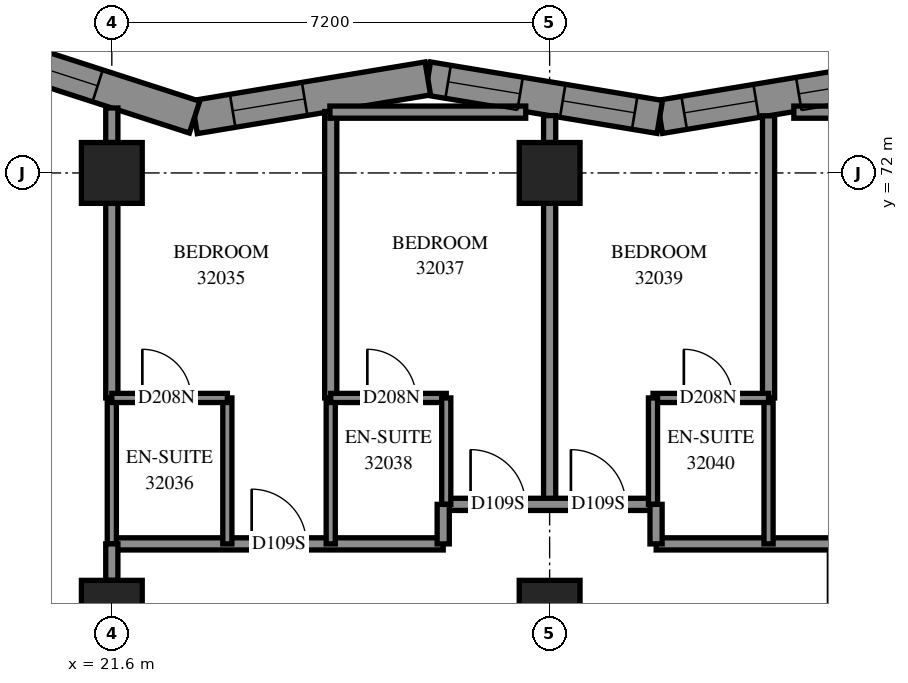
"""IFC4 building model, lengths in metres.
Left out: names, types, materials, properties, quantities, classifications, styles, units other than length and angle.
Written with IfcOpenShell. Run it as: python <this file> out.ifc"""

import sys

from ifc_helpers import new_model, si_unit, direction, frame, frame_2d, origin, origin_2d, place, context, subcontext, project, spatial, polyline, rectangle, outline, extrude, element, fill, save


model = new_model("IFC4")
c1 = context("Model", 3, precision=1e-05, world=origin(), true_north=direction((0.0, 1.0)))
c2 = subcontext(c1, "Body", "Model", "MODEL_VIEW")
j1 = project(units=[si_unit("LENGTHUNIT", "METRE"), si_unit("PLANEANGLEUNIT", "RADIAN")], contexts=[c1])
p1 = place(None, origin())
s1 = spatial("IfcSite", under=j1, at=p1, CompositionType="ELEMENT")
p2 = place(p1, origin())
s2 = spatial("IfcBuilding", under=s1, at=p2, CompositionType="ELEMENT")
p3 = place(p2, frame((0.0, 0.0, 118.6)))
s3 = spatial("IfcBuildingStorey", under=s2, at=p3, CompositionType="ELEMENT", Elevation=118.6)
for number, where, z_axis, x_axis in (
    (1, (21.6, 64.8, 0.0), (0.0, 0.0, 1.0), (1.0, 0.0, 0.0)),
    (2, (21.6, 72.0, 0.0), (0.0, 0.0, 1.0), (1.0, 0.0, 0.0)),
    (3, (28.8, 64.8, 0.0), (0.0, 0.0, 1.0), (1.0, 0.0, 0.0)),
    (4, (28.8, 72.0, 0.0), (0.0, 0.0, 1.0), (1.0, 0.0, 0.0)),
):
    element("IfcColumn", number, at=place(p3, frame(where, z_axis=z_axis, x_axis=x_axis)), inside=s3, PredefinedType="COLUMN", context=c2, shape_type="SweptSolid", body=[
        extrude(rectangle(XDim=1.0, YDim=1.0, at=origin_2d()), origin(), (0.0, 0.0, 1.0), 3.1),
    ])
p4 = place(p3, frame((34.426, 73.554, 0.0), z_axis=(0.0, 0.0, 1.0), x_axis=(-0.9865103981, -0.1636986085, 0.0)))
e5 = element("IfcWall", 5, at=p4, inside=s3, PredefinedType="SOLIDWALL", context=c2, shape_type="SweptSolid", body=[
    extrude(outline(polyline([(-0.046, -0.275), (3.821, -0.275), (3.913, 0.275), (0.046, 0.275), (-0.046, -0.275)])), origin(), (0.0, 0.0, 1.0), 3.1),
])
p5 = place(p4, frame((0.35, 0.0, 0.5)))
e6 = element("IfcOpeningElement", 6, at=p5, cuts=e5, PredefinedType="OPENING", context=c2, shape_type="SweptSolid", body=[
    extrude(rectangle(XDim=1.2, YDim=2.45, at=frame_2d((0.6, 1.225))), frame((0.0, 0.285, 0.0), z_axis=(0.0, -1.0, 0.0), x_axis=(1.0, 0.0, 0.0)), (0.0, 0.0, 1.0), 0.57),
])
p6 = place(p4, frame((2.26, 0.0, 0.5)))
e7 = element("IfcOpeningElement", 7, at=p6, cuts=e5, PredefinedType="OPENING", context=c2, shape_type="SweptSolid", body=[
    extrude(rectangle(XDim=1.2, YDim=2.45, at=frame_2d((0.6, 1.225))), frame((0.0, 0.285, 0.0), z_axis=(0.0, -1.0, 0.0), x_axis=(1.0, 0.0, 0.0)), (0.0, 0.0, 1.0), 0.57),
])
p7 = place(p3, frame((30.611, 72.921, 0.0), z_axis=(0.0, 0.0, 1.0), x_axis=(-0.9865110911, 0.1636944324, 0.0)))
e8 = element("IfcWall", 8, at=p7, inside=s3, PredefinedType="SOLIDWALL", context=c2, shape_type="SweptSolid", body=[
    extrude(outline(polyline([(0.046, -0.275), (3.913, -0.275), (3.821, 0.275), (-0.046, 0.275), (0.046, -0.275)])), origin(), (0.0, 0.0, 1.0), 3.1),
])
p8 = place(p7, frame((0.418, 0.0, 0.5)))
e9 = element("IfcOpeningElement", 9, at=p8, cuts=e8, PredefinedType="OPENING", context=c2, shape_type="SweptSolid", body=[
    extrude(rectangle(XDim=1.2, YDim=2.45, at=frame_2d((0.6, 1.225))), frame((0.0, 0.285, 0.0), z_axis=(0.0, -1.0, 0.0), x_axis=(1.0, 0.0, 0.0)), (0.0, 0.0, 1.0), 0.57),
])
p9 = place(p7, frame((2.329, 0.0, 0.5)))
e10 = element("IfcOpeningElement", 10, at=p9, cuts=e8, PredefinedType="OPENING", context=c2, shape_type="SweptSolid", body=[
    extrude(rectangle(XDim=1.2, YDim=2.45, at=frame_2d((0.6, 1.225))), frame((0.0, 0.285, 0.0), z_axis=(0.0, -1.0, 0.0), x_axis=(1.0, 0.0, 0.0)), (0.0, 0.0, 1.0), 0.57),
])
p10 = place(p3, frame((26.797, 73.554, 0.0), z_axis=(0.0, 0.0, 1.0), x_axis=(-0.9865146039, -0.1636732608, 0.0)))
e11 = element("IfcWall", 11, at=p10, inside=s3, PredefinedType="SOLIDWALL", context=c2, shape_type="SweptSolid", body=[
    extrude(outline(polyline([(-0.046, -0.275), (3.821, -0.275), (3.955, 0.275), (0.046, 0.275), (-0.046, -0.275)])), origin(), (0.0, 0.0, 1.0), 3.1),
])
p11 = place(p10, frame((2.053, 0.0, 0.5)))
e12 = element("IfcOpeningElement", 12, at=p11, cuts=e11, PredefinedType="OPENING", context=c2, shape_type="SweptSolid", body=[
    extrude(rectangle(XDim=1.2, YDim=2.45, at=frame_2d((0.6, 1.225))), frame((0.0, 0.285, 0.0), z_axis=(0.0, -1.0, 0.0), x_axis=(1.0, 0.0, 0.0)), (0.0, 0.0, 1.0), 0.57),
])
p12 = place(p3, frame((22.961, 72.918, 0.0), z_axis=(0.0, 0.0, 1.0), x_axis=(-0.9515343902, 0.3075423616, 0.0)))
e13 = element("IfcWall", 13, at=p12, inside=s3, PredefinedType="SOLIDWALL", context=c2, shape_type="SweptSolid", body=[
    extrude(outline(polyline([(0.067, -0.275), (4.076, -0.275), (3.32, 0.275), (-0.067, 0.275), (0.067, -0.275)])), origin(), (0.0, 0.0, 1.0), 3.1),
])
p13 = place(p12, frame((1.675, 0.0, 0.5)))
e14 = element("IfcOpeningElement", 14, at=p13, cuts=e13, PredefinedType="OPENING", context=c2, shape_type="SweptSolid", body=[
    extrude(rectangle(XDim=1.2, YDim=2.45, at=frame_2d((0.6, 1.225))), frame((0.0, 0.285, 0.0), z_axis=(0.0, -1.0, 0.0), x_axis=(1.0, 0.0, 0.0)), (0.0, 0.0, 1.0), 0.57),
])
p14 = place(p3, frame((21.6, 65.9, 0.0), z_axis=(0.0, 0.0, 1.0), x_axis=(1.0, 0.0, 0.0)))
e15 = element("IfcWall", 15, at=p14, inside=s3, PredefinedType="PARTITIONING", context=c2, shape_type="SweptSolid", body=[
    extrude(rectangle(XDim=5.45, YDim=0.2, at=frame_2d((2.725, 0.0))), origin(), (0.0, 0.0, 1.0), 3.1),
])
p15 = place(p14, frame((2.3, 0.0, 0.0)))
e16 = element("IfcOpeningElement", 16, at=p15, cuts=e15, PredefinedType="OPENING", context=c2, shape_type="SweptSolid", body=[
    extrude(rectangle(XDim=0.9, YDim=2.1, at=frame_2d((0.45, 1.05))), frame((0.0, 0.11, 0.0), z_axis=(0.0, -1.0, 0.0), x_axis=(1.0, 0.0, 0.0)), (0.0, 0.0, 1.0), 0.22),
])
p16 = place(p3, frame((28.8, 66.55, 0.0), z_axis=(0.0, 0.0, 1.0), x_axis=(0.0, 1.0, 0.0)))
e17 = element("IfcWall", 17, at=p16, inside=s3, PredefinedType="PARTITIONING", context=c2, shape_type="SweptSolid", body=[
    extrude(rectangle(XDim=4.95, YDim=0.2, at=frame_2d((2.475, 0.0))), origin(), (0.0, 0.0, 1.0), 3.1),
])
p17 = place(p3, frame((25.2, 68.3, 0.0), z_axis=(0.0, 0.0, 1.0), x_axis=(0.0, 1.0, 0.0)))
e18 = element("IfcWall", 18, at=p17, inside=s3, PredefinedType="PARTITIONING", context=c2, shape_type="SweptSolid", body=[
    extrude(rectangle(XDim=4.711, YDim=0.2, at=frame_2d((2.355, 0.0))), origin(), (0.0, 0.0, 1.0), 3.1),
])
p18 = place(p3, frame((32.4, 68.3, 0.0), z_axis=(0.0, 0.0, 1.0), x_axis=(0.0, 1.0, 0.0)))
e19 = element("IfcWall", 19, at=p18, inside=s3, PredefinedType="PARTITIONING", context=c2, shape_type="SweptSolid", body=[
    extrude(rectangle(XDim=4.639, YDim=0.2, at=frame_2d((2.32, 0.0))), origin(), (0.0, 0.0, 1.0), 3.1),
])
p19 = place(p3, frame((27.1, 66.55, 0.0), z_axis=(0.0, 0.0, 1.0), x_axis=(1.0, 0.0, 0.0)))
e20 = element("IfcWall", 20, at=p19, inside=s3, PredefinedType="PARTITIONING", context=c2, shape_type="SweptSolid", body=[
    extrude(rectangle(XDim=3.4, YDim=0.2, at=frame_2d((1.7, 0.0))), origin(), (0.0, 0.0, 1.0), 3.1),
])
p20 = place(p19, frame((0.4, 0.0, 0.0)))
e21 = element("IfcOpeningElement", 21, at=p20, cuts=e20, PredefinedType="OPENING", context=c2, shape_type="SweptSolid", body=[
    extrude(rectangle(XDim=0.9, YDim=2.1, at=frame_2d((0.45, 1.05))), frame((0.0, 0.11, 0.0), z_axis=(0.0, -1.0, 0.0), x_axis=(1.0, 0.0, 0.0)), (0.0, 0.0, 1.0), 0.22),
])
p21 = place(p19, frame((2.05, 0.0, 0.0)))
e22 = element("IfcOpeningElement", 22, at=p21, cuts=e20, PredefinedType="OPENING", context=c2, shape_type="SweptSolid", body=[
    extrude(rectangle(XDim=0.9, YDim=2.1, at=frame_2d((0.45, 1.05))), frame((0.0, 0.11, 0.0), z_axis=(0.0, -1.0, 0.0), x_axis=(1.0, 0.0, 0.0)), (0.0, 0.0, 1.0), 0.22),
])
p22 = place(p3, frame((32.816, 73.0, 0.0), z_axis=(0.0, 0.0, 1.0), x_axis=(1.0, 0.0, 0.0)))
e23 = element("IfcWall", 23, at=p22, inside=s3, PredefinedType="PARTITIONING", context=c2, shape_type="SweptSolid", body=[
    extrude(rectangle(XDim=3.22, YDim=0.2, at=frame_2d((1.61, 0.0))), origin(), (0.0, 0.0, 1.0), 3.1),
])
p23 = place(p3, frame((25.186, 73.0, 0.0), z_axis=(0.0, 0.0, 1.0), x_axis=(1.0, 0.0, 0.0)))
e24 = element("IfcWall", 24, at=p23, inside=s3, PredefinedType="PARTITIONING", context=c2, shape_type="SweptSolid", body=[
    extrude(rectangle(XDim=3.22, YDim=0.2, at=frame_2d((1.61, 0.0))), origin(), (0.0, 0.0, 1.0), 3.1),
])
p24 = place(p3, frame((21.6, 68.3, 0.0), z_axis=(0.0, 0.0, 1.0), x_axis=(0.0, 1.0, 0.0)))
e25 = element("IfcWall", 25, at=p24, inside=s3, PredefinedType="PARTITIONING", context=c2, shape_type="SweptSolid", body=[
    extrude(rectangle(XDim=3.2, YDim=0.2, at=frame_2d((1.6, 0.0))), origin(), (0.0, 0.0, 1.0), 2.6),
])
p25 = place(p3, frame((30.552, 65.9, 0.0), z_axis=(0.0, 0.0, 1.0), x_axis=(1.0, 0.0, 0.0)))
e26 = element("IfcWall", 26, at=p25, inside=s3, PredefinedType="PARTITIONING", context=c2, shape_type="SweptSolid", body=[
    extrude(rectangle(XDim=2.948, YDim=0.2, at=frame_2d((1.474, 0.0))), origin(), (0.0, 0.0, 1.0), 3.1),
])
p26 = place(p3, frame((21.6, 65.9, 0.0), z_axis=(0.0, 0.0, 1.0), x_axis=(0.0, 1.0, 0.0)))
e27 = element("IfcWall", 27, at=p26, inside=s3, PredefinedType="PARTITIONING", context=c2, shape_type="SweptSolid", body=[
    extrude(rectangle(XDim=2.4, YDim=0.15, at=frame_2d((1.2, 0.0))), origin(), (0.0, 0.0, 1.0), 2.6),
])
for number, where, z_axis, x_axis in (
    (28, (23.5, 65.9, 0.0), (0.0, 0.0, 1.0), (0.0, 1.0, 0.0)),
    (29, (25.2, 65.9, 0.0), (0.0, 0.0, 1.0), (0.0, 1.0, 0.0)),
    (30, (32.4, 65.9, 0.0), (0.0, 0.0, 1.0), (0.0, 1.0, 0.0)),
):
    element("IfcWall", number, at=place(p3, frame(where, z_axis=z_axis, x_axis=x_axis)), inside=s3, PredefinedType="PARTITIONING", context=c2, shape_type="SweptSolid", body=[
        extrude(rectangle(XDim=2.4, YDim=0.15, at=frame_2d((1.2, 0.0))), origin(), (0.0, 0.0, 1.0), 3.1),
    ])
p27 = place(p3, frame((25.2, 68.3, 0.0), z_axis=(0.0, 0.0, 1.0), x_axis=(1.0, 0.0, 0.0)))
e31 = element("IfcWall", 31, at=p27, inside=s3, PredefinedType="PARTITIONING", context=c2, shape_type="SweptSolid", body=[
    extrude(rectangle(XDim=1.9, YDim=0.15, at=frame_2d((0.95, 0.0))), origin(), (0.0, 0.0, 1.0), 3.1),
])
p28 = place(p27, frame((0.602, 0.0, 0.0)))
e32 = element("IfcOpeningElement", 32, at=p28, cuts=e31, PredefinedType="OPENING", context=c2, shape_type="SweptSolid", body=[
    extrude(rectangle(XDim=0.8, YDim=2.1, at=frame_2d((0.4, 1.05))), frame((0.0, 0.085, 0.0), z_axis=(0.0, -1.0, 0.0), x_axis=(1.0, 0.0, 0.0)), (0.0, 0.0, 1.0), 0.17),
])
p29 = place(p3, frame((21.6, 68.3, 0.0), z_axis=(0.0, 0.0, 1.0), x_axis=(1.0, 0.0, 0.0)))
e33 = element("IfcWall", 33, at=p29, inside=s3, PredefinedType="PARTITIONING", context=c2, shape_type="SweptSolid", body=[
    extrude(rectangle(XDim=1.9, YDim=0.15, at=frame_2d((0.95, 0.0))), origin(), (0.0, 0.0, 1.0), 3.1),
])
p30 = place(p29, frame((0.502, 0.0, 0.0)))
e34 = element("IfcOpeningElement", 34, at=p30, cuts=e33, PredefinedType="OPENING", context=c2, shape_type="SweptSolid", body=[
    extrude(rectangle(XDim=0.8, YDim=2.1, at=frame_2d((0.4, 1.05))), frame((0.0, 0.085, 0.0), z_axis=(0.0, -1.0, 0.0), x_axis=(1.0, 0.0, 0.0)), (0.0, 0.0, 1.0), 0.17),
])
p31 = place(p3, frame((30.5, 68.3, 0.0), z_axis=(0.0, 0.0, 1.0), x_axis=(1.0, 0.0, 0.0)))
e35 = element("IfcWall", 35, at=p31, inside=s3, PredefinedType="PARTITIONING", context=c2, shape_type="SweptSolid", body=[
    extrude(rectangle(XDim=1.9, YDim=0.15, at=frame_2d((0.95, 0.0))), origin(), (0.0, 0.0, 1.0), 3.1),
])
p32 = place(p31, frame((0.507, 0.0, 0.0)))
e36 = element("IfcOpeningElement", 36, at=p32, cuts=e35, PredefinedType="OPENING", context=c2, shape_type="SweptSolid", body=[
    extrude(rectangle(XDim=0.8, YDim=2.1, at=frame_2d((0.4, 1.05))), frame((0.0, 0.085, 0.0), z_axis=(0.0, -1.0, 0.0), x_axis=(1.0, 0.0, 0.0)), (0.0, 0.0, 1.0), 0.17),
])
for number, where, z_axis, x_axis in (
    (37, (27.1, 66.55, 0.0), (0.0, 0.0, 1.0), (0.0, 1.0, 0.0)),
    (38, (30.5, 66.55, 0.0), (0.0, 0.0, 1.0), (0.0, 1.0, 0.0)),
):
    element("IfcWall", number, at=place(p3, frame(where, z_axis=z_axis, x_axis=x_axis)), inside=s3, PredefinedType="PARTITIONING", context=c2, shape_type="SweptSolid", body=[
        extrude(rectangle(XDim=1.75, YDim=0.15, at=frame_2d((0.875, 0.0))), origin(), (0.0, 0.0, 1.0), 3.1),
    ])
for number, where, z_axis, x_axis in (
    (39, (27.05, 65.9, 0.0), (0.0, 0.0, 1.0), (0.0, 1.0, 0.0)),
    (40, (30.55, 65.9, 0.0), (0.0, 0.0, 1.0), (0.0, 1.0, 0.0)),
):
    element("IfcWall", number, at=place(p3, frame(where, z_axis=z_axis, x_axis=x_axis)), inside=s3, PredefinedType="PARTITIONING", context=c2, shape_type="SweptSolid", body=[
        extrude(rectangle(XDim=0.65, YDim=0.2, at=frame_2d((0.325, 0.0))), origin(), (0.0, 0.0, 1.0), 3.1),
    ])
p33 = place(p3, frame((21.6, 65.3, 0.0), z_axis=(0.0, 0.0, 1.0), x_axis=(0.0, 1.0, 0.0)))
e41 = element("IfcWall", 41, at=p33, inside=s3, PredefinedType="PARTITIONING", context=c2, shape_type="SweptSolid", body=[
    extrude(rectangle(XDim=0.6, YDim=0.2, at=frame_2d((0.3, 0.0))), origin(), (0.0, 0.0, 1.0), 2.6),
])
p34 = place(p3, frame((21.6, 72.5, 0.0), z_axis=(0.0, 0.0, 1.0), x_axis=(0.0, 1.0, 0.0)))
e42 = element("IfcWall", 42, at=p34, inside=s3, PredefinedType="PARTITIONING", context=c2, shape_type="SweptSolid", body=[
    extrude(rectangle(XDim=0.569, YDim=0.2, at=frame_2d((0.284, 0.0))), origin(), (0.0, 0.0, 1.0), 3.1),
])
p35 = place(p3, frame((28.8, 72.5, 0.0), z_axis=(0.0, 0.0, 1.0), x_axis=(0.0, 1.0, 0.0)))
e43 = element("IfcWall", 43, at=p35, inside=s3, PredefinedType="PARTITIONING", context=c2, shape_type="SweptSolid", body=[
    extrude(rectangle(XDim=0.443, YDim=0.2, at=frame_2d((0.222, 0.0))), origin(), (0.0, 0.0, 1.0), 3.1),
])
p36 = place(p5, origin())
e44 = element("IfcWindow", 44, at=p36, inside=s3, PartitioningType="SINGLE_PANEL", PredefinedType="WINDOW", context=c2, shape_type="SweptSolid", body=[
    extrude(rectangle(XDim=1.2, YDim=2.45, at=frame_2d((0.6, 1.225))), frame((0.0, 0.155, 0.0), z_axis=(0.0, -1.0, 0.0), x_axis=(1.0, 0.0, 0.0)), (0.0, 0.0, 1.0), 0.06),
])
fill(e6, e44)
p37 = place(p6, origin())
e45 = element("IfcWindow", 45, at=p37, inside=s3, PartitioningType="SINGLE_PANEL", PredefinedType="WINDOW", context=c2, shape_type="SweptSolid", body=[
    extrude(rectangle(XDim=1.2, YDim=2.45, at=frame_2d((0.6, 1.225))), frame((0.0, 0.155, 0.0), z_axis=(0.0, -1.0, 0.0), x_axis=(1.0, 0.0, 0.0)), (0.0, 0.0, 1.0), 0.06),
])
fill(e7, e45)
p38 = place(p8, origin())
e46 = element("IfcWindow", 46, at=p38, inside=s3, PartitioningType="SINGLE_PANEL", PredefinedType="WINDOW", context=c2, shape_type="SweptSolid", body=[
    extrude(rectangle(XDim=1.2, YDim=2.45, at=frame_2d((0.6, 1.225))), frame((0.0, 0.155, 0.0), z_axis=(0.0, -1.0, 0.0), x_axis=(1.0, 0.0, 0.0)), (0.0, 0.0, 1.0), 0.06),
])
fill(e9, e46)
p39 = place(p9, origin())
e47 = element("IfcWindow", 47, at=p39, inside=s3, PartitioningType="SINGLE_PANEL", PredefinedType="WINDOW", context=c2, shape_type="SweptSolid", body=[
    extrude(rectangle(XDim=1.2, YDim=2.45, at=frame_2d((0.6, 1.225))), frame((0.0, 0.155, 0.0), z_axis=(0.0, -1.0, 0.0), x_axis=(1.0, 0.0, 0.0)), (0.0, 0.0, 1.0), 0.06),
])
fill(e10, e47)
p40 = place(p11, origin())
e48 = element("IfcWindow", 48, at=p40, inside=s3, PartitioningType="SINGLE_PANEL", PredefinedType="WINDOW", context=c2, shape_type="SweptSolid", body=[
    extrude(rectangle(XDim=1.2, YDim=2.45, at=frame_2d((0.6, 1.225))), frame((0.0, 0.155, 0.0), z_axis=(0.0, -1.0, 0.0), x_axis=(1.0, 0.0, 0.0)), (0.0, 0.0, 1.0), 0.06),
])
fill(e12, e48)
p41 = place(p13, origin())
e49 = element("IfcWindow", 49, at=p41, inside=s3, PartitioningType="SINGLE_PANEL", PredefinedType="WINDOW", context=c2, shape_type="SweptSolid", body=[
    extrude(rectangle(XDim=1.2, YDim=2.45, at=frame_2d((0.6, 1.225))), frame((0.0, 0.155, 0.0), z_axis=(0.0, -1.0, 0.0), x_axis=(1.0, 0.0, 0.0)), (0.0, 0.0, 1.0), 0.06),
])
fill(e14, e49)
p42 = place(p15, origin())
e50 = element("IfcDoor", 50, at=p42, inside=s3, OperationType="SINGLE_SWING_RIGHT", PredefinedType="DOOR", context=c2, shape_type="SweptSolid", body=[
    extrude(rectangle(XDim=0.9, YDim=2.1, at=frame_2d((0.45, 1.05))), frame((0.0, 0.025, 0.0), z_axis=(0.0, -1.0, 0.0), x_axis=(1.0, 0.0, 0.0)), (0.0, 0.0, 1.0), 0.05),
])
fill(e16, e50)
p43 = place(p30, origin())
e51 = element("IfcDoor", 51, at=p43, inside=s3, OperationType="SINGLE_SWING_RIGHT", PredefinedType="DOOR", context=c2, shape_type="SweptSolid", body=[
    extrude(rectangle(XDim=0.8, YDim=2.1, at=frame_2d((0.4, 1.05))), frame((0.0, 0.025, 0.0), z_axis=(0.0, -1.0, 0.0), x_axis=(1.0, 0.0, 0.0)), (0.0, 0.0, 1.0), 0.05),
])
fill(e34, e51)
p44 = place(p20, origin())
e52 = element("IfcDoor", 52, at=p44, inside=s3, OperationType="SINGLE_SWING_LEFT", PredefinedType="DOOR", context=c2, shape_type="SweptSolid", body=[
    extrude(rectangle(XDim=0.9, YDim=2.1, at=frame_2d((0.45, 1.05))), frame((0.0, 0.025, 0.0), z_axis=(0.0, -1.0, 0.0), x_axis=(1.0, 0.0, 0.0)), (0.0, 0.0, 1.0), 0.05),
])
fill(e21, e52)
p45 = place(p28, origin())
e53 = element("IfcDoor", 53, at=p45, inside=s3, OperationType="SINGLE_SWING_RIGHT", PredefinedType="DOOR", context=c2, shape_type="SweptSolid", body=[
    extrude(rectangle(XDim=0.8, YDim=2.1, at=frame_2d((0.4, 1.05))), frame((0.0, 0.025, 0.0), z_axis=(0.0, -1.0, 0.0), x_axis=(1.0, 0.0, 0.0)), (0.0, 0.0, 1.0), 0.05),
])
fill(e32, e53)
p46 = place(p21, origin())
e54 = element("IfcDoor", 54, at=p46, inside=s3, OperationType="SINGLE_SWING_RIGHT", PredefinedType="DOOR", context=c2, shape_type="SweptSolid", body=[
    extrude(rectangle(XDim=0.9, YDim=2.1, at=frame_2d((0.45, 1.05))), frame((0.0, 0.025, 0.0), z_axis=(0.0, -1.0, 0.0), x_axis=(1.0, 0.0, 0.0)), (0.0, 0.0, 1.0), 0.05),
])
fill(e22, e54)
p47 = place(p32, origin())
e55 = element("IfcDoor", 55, at=p47, inside=s3, OperationType="SINGLE_SWING_RIGHT", PredefinedType="DOOR", context=c2, shape_type="SweptSolid", body=[
    extrude(rectangle(XDim=0.8, YDim=2.1, at=frame_2d((0.4, 1.05))), frame((0.0, 0.025, 0.0), z_axis=(0.0, -1.0, 0.0), x_axis=(1.0, 0.0, 0.0)), (0.0, 0.0, 1.0), 0.05),
])
fill(e36, e55)
save(model, sys.argv[1])
